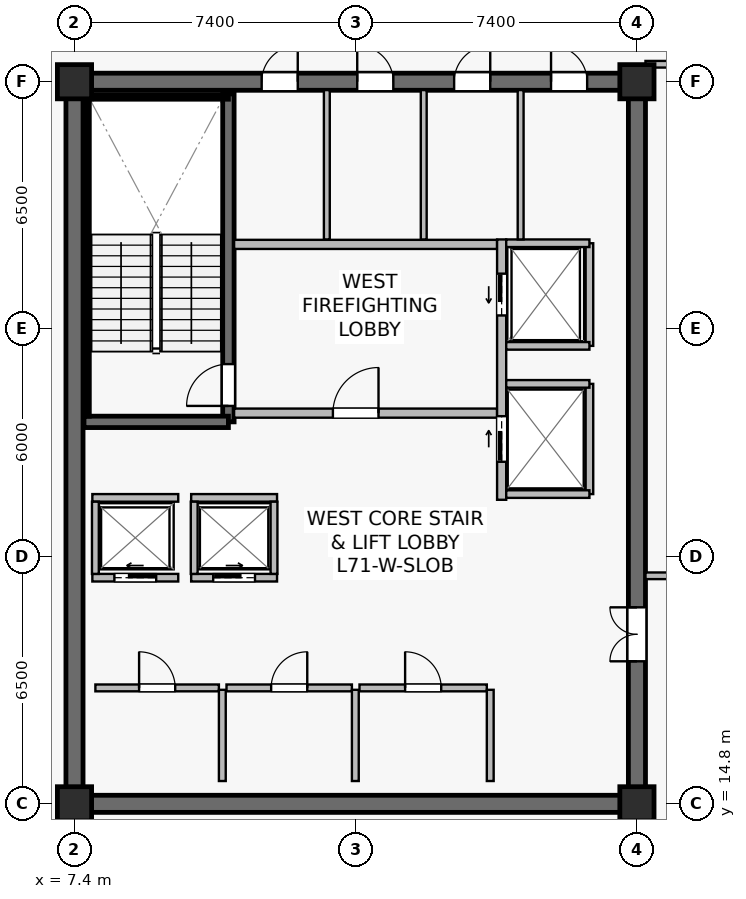
"""IFC4 building model, lengths in metres.
Left out: names, types, materials, properties, quantities, classifications, styles, units other than length and angle.
Written with IfcOpenShell. Run it as: python <this file> out.ifc"""

import sys

from ifc_helpers import new_model, si_unit, direction, frame, frame_2d, origin, origin_2d, place, context, subcontext, project, spatial, rectangle, extrude, source, transform, mapped, element, fill, save


model = new_model("IFC4")
c1 = context("Model", 3, precision=1e-05, world=origin(), true_north=direction((0.0, 1.0)))
c2 = subcontext(c1, "Body", "Model", "MODEL_VIEW")
j1 = project(units=[si_unit("LENGTHUNIT", "METRE"), si_unit("PLANEANGLEUNIT", "RADIAN")], contexts=[c1])
p1 = place(None, origin())
s1 = spatial("IfcSite", under=j1, at=p1, CompositionType="ELEMENT")
p2 = place(p1, origin())
s2 = spatial("IfcBuilding", under=s1, at=p2, CompositionType="ELEMENT")
p3 = place(p2, frame((0.0, 0.0, 297.6)))
s3 = spatial("IfcBuildingStorey", under=s2, at=p3, CompositionType="ELEMENT", Elevation=297.6)
p4 = place(p3, frame((7.175, 14.8, 0.0), z_axis=(0.0, 0.0, 1.0), x_axis=(1.0, 0.0, 0.0)))
e1 = element("IfcWall", 1, at=p4, inside=s3, PredefinedType="SHEAR", context=c2, shape_type="SweptSolid", body=[
    extrude(rectangle(XDim=15.25, YDim=0.45, at=frame_2d((7.625, 0.0))), origin(), (0.0, 0.0, 1.0), 3.9),
])
p5 = place(p3, frame((7.175, 33.8, 0.0), z_axis=(0.0, 0.0, 1.0), x_axis=(1.0, 0.0, 0.0)))
e2 = element("IfcWall", 2, at=p5, inside=s3, PredefinedType="SHEAR", context=c2, shape_type="SweptSolid", body=[
    extrude(rectangle(XDim=15.25, YDim=0.45, at=frame_2d((7.625, 0.0))), origin(), (0.0, 0.0, 1.0), 3.9),
])
p6 = place(p5, frame((5.15, 0.0, 0.0)))
e3 = element("IfcOpeningElement", 3, at=p6, cuts=e2, PredefinedType="OPENING", context=c2, shape_type="SweptSolid", body=[
    extrude(rectangle(XDim=0.95, YDim=2.15, at=frame_2d((0.475, 1.075))), frame((0.0, 0.235, 0.0), z_axis=(0.0, -1.0, 0.0), x_axis=(1.0, 0.0, 0.0)), (0.0, 0.0, 1.0), 0.47),
])
p7 = place(p5, frame((7.665, 0.0, 0.0)))
e4 = element("IfcOpeningElement", 4, at=p7, cuts=e2, PredefinedType="OPENING", context=c2, shape_type="SweptSolid", body=[
    extrude(rectangle(XDim=0.95, YDim=2.15, at=frame_2d((0.475, 1.075))), frame((0.0, 0.235, 0.0), z_axis=(0.0, -1.0, 0.0), x_axis=(1.0, 0.0, 0.0)), (0.0, 0.0, 1.0), 0.47),
])
p8 = place(p5, frame((10.215, 0.0, 0.0)))
e5 = element("IfcOpeningElement", 5, at=p8, cuts=e2, PredefinedType="OPENING", context=c2, shape_type="SweptSolid", body=[
    extrude(rectangle(XDim=0.95, YDim=2.15, at=frame_2d((0.475, 1.075))), frame((0.0, 0.235, 0.0), z_axis=(0.0, -1.0, 0.0), x_axis=(1.0, 0.0, 0.0)), (0.0, 0.0, 1.0), 0.47),
])
p9 = place(p5, frame((12.765, 0.0, 0.0)))
e6 = element("IfcOpeningElement", 6, at=p9, cuts=e2, PredefinedType="OPENING", context=c2, shape_type="SweptSolid", body=[
    extrude(rectangle(XDim=0.95, YDim=2.15, at=frame_2d((0.475, 1.075))), frame((0.0, 0.235, 0.0), z_axis=(0.0, -1.0, 0.0), x_axis=(1.0, 0.0, 0.0)), (0.0, 0.0, 1.0), 0.47),
])
p10 = place(p3, frame((7.4, 15.025, 0.0), z_axis=(0.0, 0.0, 1.0), x_axis=(0.0, 1.0, 0.0)))
e7 = element("IfcWall", 7, at=p10, inside=s3, PredefinedType="SHEAR", context=c2, shape_type="SweptSolid", body=[
    extrude(rectangle(XDim=18.55, YDim=0.45, at=frame_2d((9.275, 0.0))), origin(), (0.0, 0.0, 1.0), 3.9),
])
p11 = place(p3, frame((22.2, 15.025, 0.0), z_axis=(0.0, 0.0, 1.0), x_axis=(0.0, 1.0, 0.0)))
e8 = element("IfcWall", 8, at=p11, inside=s3, PredefinedType="SHEAR", context=c2, shape_type="SweptSolid", body=[
    extrude(rectangle(XDim=18.55, YDim=0.45, at=frame_2d((9.275, 0.0))), origin(), (0.0, 0.0, 1.0), 3.9),
])
p12 = place(p11, frame((3.525, 0.0, 0.0)))
e9 = element("IfcOpeningElement", 9, at=p12, cuts=e8, PredefinedType="OPENING", context=c2, shape_type="SweptSolid", body=[
    extrude(rectangle(XDim=1.42, YDim=2.2, at=frame_2d((0.71, 1.1))), frame((0.0, 0.235, 0.0), z_axis=(0.0, -1.0, 0.0), x_axis=(1.0, 0.0, 0.0)), (0.0, 0.0, 1.0), 0.47),
])
p13 = place(p3, frame((11.45, 24.85, 0.0), z_axis=(0.0, 0.0, 1.0), x_axis=(0.0, 1.0, 0.0)))
e10 = element("IfcWall", 10, at=p13, inside=s3, PredefinedType="SHEAR", context=c2, shape_type="SweptSolid", body=[
    extrude(rectangle(XDim=8.63, YDim=0.3, at=frame_2d((4.315, 0.0))), origin(), (0.0, 0.0, 1.0), 3.9),
])
p14 = place(p13, frame((0.42, 0.0, 0.0)))
e11 = element("IfcOpeningElement", 11, at=p14, cuts=e10, PredefinedType="OPENING", context=c2, shape_type="SweptSolid", body=[
    extrude(rectangle(XDim=1.1, YDim=2.15, at=frame_2d((0.55, 1.075))), frame((0.0, 0.16, 0.0), z_axis=(0.0, -1.0, 0.0), x_axis=(1.0, 0.0, 0.0)), (0.0, 0.0, 1.0), 0.32),
])
p15 = place(p3, frame((7.65, 24.85, 0.0), z_axis=(0.0, 0.0, 1.0), x_axis=(1.0, 0.0, 0.0)))
e12 = element("IfcWall", 12, at=p15, inside=s3, PredefinedType="SHEAR", context=c2, shape_type="SweptSolid", body=[
    extrude(rectangle(XDim=3.8, YDim=0.3, at=frame_2d((1.9, 0.0))), origin(), (0.0, 0.0, 1.0), 3.9),
])
p16 = place(p3, frame((7.73, 33.4, 0.0), z_axis=(0.0, 0.0, 1.0), x_axis=(1.0, 0.0, 0.0)))
e13 = element("IfcWall", 13, at=p16, inside=s3, PredefinedType="SOLIDWALL", context=c2, shape_type="SweptSolid", body=[
    extrude(rectangle(XDim=3.72, YDim=0.12, at=frame_2d((1.86, 0.0))), origin(), (0.0, 0.0, 1.0), 3.9),
])
p17 = place(p3, frame((7.73, 25.0, 0.0), z_axis=(0.0, 0.0, 1.0), x_axis=(0.0, 1.0, 0.0)))
e14 = element("IfcWall", 14, at=p17, inside=s3, PredefinedType="SOLIDWALL", context=c2, shape_type="SweptSolid", body=[
    extrude(rectangle(XDim=8.32, YDim=0.12, at=frame_2d((4.16, 0.0))), origin(), (0.0, 0.0, 1.0), 3.9),
])
m1 = source(origin(), c2, "Body", "SweptSolid", [
    extrude(rectangle(XDim=0.9, YDim=0.9, at=origin_2d()), origin(), (0.0, 0.0, 1.0), 4.2),
])
for number, where, z_axis, x_axis in (
    (15, (7.4, 14.8, 0.0), (0.0, 0.0, 1.0), (1.0, 0.0, 0.0)),
    (16, (22.2, 14.8, 0.0), (0.0, 0.0, 1.0), (1.0, 0.0, 0.0)),
    (17, (7.4, 33.8, 0.0), (0.0, 0.0, 1.0), (1.0, 0.0, 0.0)),
    (18, (22.2, 33.8, 0.0), (0.0, 0.0, 1.0), (1.0, 0.0, 0.0)),
):
    element("IfcColumn", number, at=place(p3, frame(where, z_axis=z_axis, x_axis=x_axis)), inside=s3, PredefinedType="COLUMN", context=c2, shape_type="MappedRepresentation", body=[
        mapped(m1, transform((0.0, 0.0, 0.0), scale=1.0)),
    ])
p18 = place(p3, frame((11.6, 25.08, 0.0), z_axis=(0.0, 0.0, 1.0), x_axis=(1.0, 0.0, 0.0)))
e19 = element("IfcWall", 19, at=p18, inside=s3, PredefinedType="SOLIDWALL", context=c2, shape_type="SweptSolid", body=[
    extrude(rectangle(XDim=6.92, YDim=0.24, at=frame_2d((3.46, 0.0))), origin(), (0.0, 0.0, 1.0), 3.297),
])
p19 = place(p18, frame((2.6, 0.0, 0.0)))
e20 = element("IfcOpeningElement", 20, at=p19, cuts=e19, PredefinedType="OPENING", context=c2, shape_type="SweptSolid", body=[
    extrude(rectangle(XDim=1.2, YDim=2.16, at=frame_2d((0.6, 1.08))), frame((0.0, 0.13, 0.0), z_axis=(0.0, -1.0, 0.0), x_axis=(1.0, 0.0, 0.0)), (0.0, 0.0, 1.0), 0.26),
])
p20 = place(p3, frame((11.6, 29.52, 0.0), z_axis=(0.0, 0.0, 1.0), x_axis=(1.0, 0.0, 0.0)))
e21 = element("IfcWall", 21, at=p20, inside=s3, PredefinedType="SOLIDWALL", context=c2, shape_type="SweptSolid", body=[
    extrude(rectangle(XDim=6.92, YDim=0.24, at=frame_2d((3.46, 0.0))), origin(), (0.0, 0.0, 1.0), 3.297),
])
p21 = place(p3, frame((18.64, 22.8, 0.0), z_axis=(0.0, 0.0, 1.0), x_axis=(0.0, 1.0, 0.0)))
e22 = element("IfcWall", 22, at=p21, inside=s3, PredefinedType="SOLIDWALL", context=c2, shape_type="SweptSolid", body=[
    extrude(rectangle(XDim=6.85, YDim=0.24, at=frame_2d((3.425, 0.0))), origin(), (0.0, 0.0, 1.0), 3.035),
])
p22 = place(p21, frame((4.85, 0.0, 0.0)))
e23 = element("IfcOpeningElement", 23, at=p22, cuts=e22, PredefinedType="OPENING", context=c2, shape_type="SweptSolid", body=[
    extrude(rectangle(XDim=1.1, YDim=2.22, at=frame_2d((0.55, 1.11))), frame((0.0, 0.13, 0.0), z_axis=(0.0, -1.0, 0.0), x_axis=(1.0, 0.0, 0.0)), (0.0, 0.0, 1.0), 0.26),
])
p23 = place(p21, frame((1.0, 0.0, 0.0)))
e24 = element("IfcOpeningElement", 24, at=p23, cuts=e22, PredefinedType="OPENING", context=c2, shape_type="SweptSolid", body=[
    extrude(rectangle(XDim=1.2, YDim=2.22, at=frame_2d((0.6, 1.11))), frame((0.0, 0.13, 0.0), z_axis=(0.0, -1.0, 0.0), x_axis=(1.0, 0.0, 0.0)), (0.0, 0.0, 1.0), 0.26),
])
p24 = place(p3, frame((7.87, 20.75, 0.0), z_axis=(0.0, 0.0, 1.0), x_axis=(1.0, 0.0, 0.0)))
e25 = element("IfcWall", 25, at=p24, inside=s3, PredefinedType="SOLIDWALL", context=c2, shape_type="SweptSolid", body=[
    extrude(rectangle(XDim=2.26, YDim=0.2, at=frame_2d((1.13, 0.0))), origin(), (0.0, 0.0, 1.0), 3.9),
])
p25 = place(p24, frame((0.58, 0.0, 0.0)))
e26 = element("IfcOpeningElement", 26, at=p25, cuts=e25, PredefinedType="OPENING", context=c2, shape_type="SweptSolid", body=[
    extrude(rectangle(XDim=1.1, YDim=2.22, at=frame_2d((0.55, 1.11))), frame((0.0, 0.11, 0.0), z_axis=(0.0, -1.0, 0.0), x_axis=(1.0, 0.0, 0.0)), (0.0, 0.0, 1.0), 0.22),
])
p26 = place(p3, frame((7.87, 22.85, 0.0), z_axis=(0.0, 0.0, 1.0), x_axis=(1.0, 0.0, 0.0)))
e27 = element("IfcWall", 27, at=p26, inside=s3, PredefinedType="SOLIDWALL", context=c2, shape_type="SweptSolid", body=[
    extrude(rectangle(XDim=2.26, YDim=0.2, at=frame_2d((1.13, 0.0))), origin(), (0.0, 0.0, 1.0), 3.9),
])
p27 = place(p3, frame((7.95, 20.85, 0.0), z_axis=(0.0, 0.0, 1.0), x_axis=(0.0, 1.0, 0.0)))
e28 = element("IfcWall", 28, at=p27, inside=s3, PredefinedType="SOLIDWALL", context=c2, shape_type="SweptSolid", body=[
    extrude(rectangle(XDim=1.9, YDim=0.18, at=frame_2d((0.95, 0.0))), origin(), (0.0, 0.0, 1.0), 3.9),
])
p28 = place(p3, frame((10.47, 20.75, 0.0), z_axis=(0.0, 0.0, 1.0), x_axis=(1.0, 0.0, 0.0)))
e29 = element("IfcWall", 29, at=p28, inside=s3, PredefinedType="SOLIDWALL", context=c2, shape_type="SweptSolid", body=[
    extrude(rectangle(XDim=2.26, YDim=0.2, at=frame_2d((1.13, 0.0))), origin(), (0.0, 0.0, 1.0), 3.9),
])
p29 = place(p28, frame((0.58, 0.0, 0.0)))
e30 = element("IfcOpeningElement", 30, at=p29, cuts=e29, PredefinedType="OPENING", context=c2, shape_type="SweptSolid", body=[
    extrude(rectangle(XDim=1.1, YDim=2.22, at=frame_2d((0.55, 1.11))), frame((0.0, 0.11, 0.0), z_axis=(0.0, -1.0, 0.0), x_axis=(1.0, 0.0, 0.0)), (0.0, 0.0, 1.0), 0.22),
])
p30 = place(p3, frame((10.47, 22.85, 0.0), z_axis=(0.0, 0.0, 1.0), x_axis=(1.0, 0.0, 0.0)))
e31 = element("IfcWall", 31, at=p30, inside=s3, PredefinedType="SOLIDWALL", context=c2, shape_type="SweptSolid", body=[
    extrude(rectangle(XDim=2.26, YDim=0.2, at=frame_2d((1.13, 0.0))), origin(), (0.0, 0.0, 1.0), 3.9),
])
for number, where, z_axis, x_axis in (
    (32, (10.55, 20.85, 0.0), (0.0, 0.0, 1.0), (0.0, 1.0, 0.0)),
    (33, (12.65, 20.85, 0.0), (0.0, 0.0, 1.0), (0.0, 1.0, 0.0)),
):
    element("IfcWall", number, at=place(p3, frame(where, z_axis=z_axis, x_axis=x_axis)), inside=s3, PredefinedType="SOLIDWALL", context=c2, shape_type="SweptSolid", body=[
        extrude(rectangle(XDim=1.9, YDim=0.18, at=frame_2d((0.95, 0.0))), origin(), (0.0, 0.0, 1.0), 3.9),
    ])
p31 = place(p3, frame((20.95, 26.85, 0.0), z_axis=(0.0, 0.0, 1.0), x_axis=(0.0, 1.0, 0.0)))
e34 = element("IfcWall", 34, at=p31, inside=s3, PredefinedType="SOLIDWALL", context=c2, shape_type="SweptSolid", body=[
    extrude(rectangle(XDim=2.7, YDim=0.2, at=frame_2d((1.35, 0.0))), origin(), (0.0, 0.0, 1.0), 3.9),
])
p32 = place(p3, frame((18.76, 29.55, 0.0), z_axis=(0.0, 0.0, 1.0), x_axis=(1.0, 0.0, 0.0)))
e35 = element("IfcWall", 35, at=p32, inside=s3, PredefinedType="SOLIDWALL", context=c2, shape_type="SweptSolid", body=[
    extrude(rectangle(XDim=2.19, YDim=0.2, at=frame_2d((1.095, 0.0))), origin(), (0.0, 0.0, 1.0), 3.9),
])
p33 = place(p3, frame((18.76, 26.85, 0.0), z_axis=(0.0, 0.0, 1.0), x_axis=(1.0, 0.0, 0.0)))
e36 = element("IfcWall", 36, at=p33, inside=s3, PredefinedType="SOLIDWALL", context=c2, shape_type="SweptSolid", body=[
    extrude(rectangle(XDim=2.19, YDim=0.2, at=frame_2d((1.095, 0.0))), origin(), (0.0, 0.0, 1.0), 3.297),
])
p34 = place(p3, frame((20.95, 22.95, 0.0), z_axis=(0.0, 0.0, 1.0), x_axis=(0.0, 1.0, 0.0)))
e37 = element("IfcWall", 37, at=p34, inside=s3, PredefinedType="SOLIDWALL", context=c2, shape_type="SweptSolid", body=[
    extrude(rectangle(XDim=2.9, YDim=0.2, at=frame_2d((1.45, 0.0))), origin(), (0.0, 0.0, 1.0), 3.035),
])
for number, where, z_axis, x_axis in (
    (38, (18.76, 25.85, 0.0), (0.0, 0.0, 1.0), (1.0, 0.0, 0.0)),
    (39, (18.76, 22.95, 0.0), (0.0, 0.0, 1.0), (1.0, 0.0, 0.0)),
):
    element("IfcWall", number, at=place(p3, frame(where, z_axis=z_axis, x_axis=x_axis)), inside=s3, PredefinedType="SOLIDWALL", context=c2, shape_type="SweptSolid", body=[
        extrude(rectangle(XDim=2.19, YDim=0.2, at=frame_2d((1.095, 0.0))), origin(), (0.0, 0.0, 1.0), 3.9),
    ])
p35 = place(p3, frame((7.95, 17.85, 0.0), z_axis=(0.0, 0.0, 1.0), x_axis=(1.0, 0.0, 0.0)))
e40 = element("IfcWall", 40, at=p35, inside=s3, PredefinedType="SOLIDWALL", context=c2, shape_type="SweptSolid", body=[
    extrude(rectangle(XDim=3.25, YDim=0.18, at=frame_2d((1.625, 0.0))), origin(), (0.0, 0.0, 1.0), 3.9),
])
p36 = place(p35, frame((1.15, 0.0, 0.0)))
e41 = element("IfcOpeningElement", 41, at=p36, cuts=e40, PredefinedType="OPENING", context=c2, shape_type="SweptSolid", body=[
    extrude(rectangle(XDim=0.95, YDim=2.15, at=frame_2d((0.475, 1.075))), frame((0.0, 0.1, 0.0), z_axis=(0.0, -1.0, 0.0), x_axis=(1.0, 0.0, 0.0)), (0.0, 0.0, 1.0), 0.2),
])
p37 = place(p3, frame((11.29, 15.4, 0.0), z_axis=(0.0, 0.0, 1.0), x_axis=(0.0, 1.0, 0.0)))
e42 = element("IfcWall", 42, at=p37, inside=s3, PredefinedType="SOLIDWALL", context=c2, shape_type="SweptSolid", body=[
    extrude(rectangle(XDim=2.4, YDim=0.18, at=frame_2d((1.2, 0.0))), origin(), (0.0, 0.0, 1.0), 3.9),
])
p38 = place(p3, frame((11.4, 17.85, 0.0), z_axis=(0.0, 0.0, 1.0), x_axis=(1.0, 0.0, 0.0)))
e43 = element("IfcWall", 43, at=p38, inside=s3, PredefinedType="SOLIDWALL", context=c2, shape_type="SweptSolid", body=[
    extrude(rectangle(XDim=3.3, YDim=0.18, at=frame_2d((1.65, 0.0))), origin(), (0.0, 0.0, 1.0), 3.297),
])
p39 = place(p38, frame((1.175, 0.0, 0.0)))
e44 = element("IfcOpeningElement", 44, at=p39, cuts=e43, PredefinedType="OPENING", context=c2, shape_type="SweptSolid", body=[
    extrude(rectangle(XDim=0.95, YDim=2.15, at=frame_2d((0.475, 1.075))), frame((0.0, 0.1, 0.0), z_axis=(0.0, -1.0, 0.0), x_axis=(1.0, 0.0, 0.0)), (0.0, 0.0, 1.0), 0.2),
])
p40 = place(p3, frame((14.79, 15.4, 0.0), z_axis=(0.0, 0.0, 1.0), x_axis=(0.0, 1.0, 0.0)))
e45 = element("IfcWall", 45, at=p40, inside=s3, PredefinedType="SOLIDWALL", context=c2, shape_type="SweptSolid", body=[
    extrude(rectangle(XDim=2.4, YDim=0.18, at=frame_2d((1.2, 0.0))), origin(), (0.0, 0.0, 1.0), 3.297),
])
p41 = place(p3, frame((14.9, 17.85, 0.0), z_axis=(0.0, 0.0, 1.0), x_axis=(1.0, 0.0, 0.0)))
e46 = element("IfcWall", 46, at=p41, inside=s3, PredefinedType="SOLIDWALL", context=c2, shape_type="SweptSolid", body=[
    extrude(rectangle(XDim=3.35, YDim=0.18, at=frame_2d((1.675, 0.0))), origin(), (0.0, 0.0, 1.0), 3.297),
])
p42 = place(p41, frame((1.2, 0.0, 0.0)))
e47 = element("IfcOpeningElement", 47, at=p42, cuts=e46, PredefinedType="OPENING", context=c2, shape_type="SweptSolid", body=[
    extrude(rectangle(XDim=0.95, YDim=2.15, at=frame_2d((0.475, 1.075))), frame((0.0, 0.1, 0.0), z_axis=(0.0, -1.0, 0.0), x_axis=(1.0, 0.0, 0.0)), (0.0, 0.0, 1.0), 0.2),
])
p43 = place(p3, frame((18.34, 15.4, 0.0), z_axis=(0.0, 0.0, 1.0), x_axis=(0.0, 1.0, 0.0)))
e48 = element("IfcWall", 48, at=p43, inside=s3, PredefinedType="SOLIDWALL", context=c2, shape_type="SweptSolid", body=[
    extrude(rectangle(XDim=2.4, YDim=0.18, at=frame_2d((1.2, 0.0))), origin(), (0.0, 0.0, 1.0), 3.9),
])
for number, where, z_axis, x_axis in (
    (49, (14.04, 29.65, 0.0), (0.0, 0.0, 1.0), (0.0, 1.0, 0.0)),
    (50, (16.59, 29.65, 0.0), (0.0, 0.0, 1.0), (0.0, 1.0, 0.0)),
    (51, (19.14, 29.65, 0.0), (0.0, 0.0, 1.0), (0.0, 1.0, 0.0)),
):
    element("IfcWall", number, at=place(p3, frame(where, z_axis=z_axis, x_axis=x_axis)), inside=s3, PredefinedType="PLUMBINGWALL", context=c2, shape_type="SweptSolid", body=[
        extrude(rectangle(XDim=3.93, YDim=0.155, at=frame_2d((1.965, 0.0))), origin(), (0.0, 0.0, 1.0), 3.9),
    ])
p44 = place(p3, frame((22.425, 34.26, 0.0), z_axis=(0.0, 0.0, 1.0), x_axis=(1.0, 0.0, 0.0)))
e52 = element("IfcWall", 52, at=p44, inside=s3, PredefinedType="PARTITIONING", context=c2, shape_type="SweptSolid", body=[
    extrude(rectangle(XDim=4.075, YDim=0.175, at=frame_2d((2.038, 0.0))), origin(), (0.0, 0.0, 1.0), 3.635),
])
p45 = place(p3, frame((22.425, 20.8, 0.0), z_axis=(0.0, 0.0, 1.0), x_axis=(1.0, 0.0, 0.0)))
e53 = element("IfcWall", 53, at=p45, inside=s3, PredefinedType="PARTITIONING", context=c2, shape_type="SweptSolid", body=[
    extrude(rectangle(XDim=4.075, YDim=0.175, at=frame_2d((2.038, 0.0))), origin(), (0.0, 0.0, 1.0), 3.9),
])
p46 = place(p45, frame((1.35, 0.0, 0.0)))
e54 = element("IfcOpeningElement", 54, at=p46, cuts=e53, PredefinedType="OPENING", context=c2, shape_type="SweptSolid", body=[
    extrude(rectangle(XDim=0.95, YDim=2.15, at=frame_2d((0.475, 1.075))), frame((0.0, 0.098, 0.0), z_axis=(0.0, -1.0, 0.0), x_axis=(1.0, 0.0, 0.0)), (0.0, 0.0, 1.0), 0.195),
])
m2 = source(origin(), c2, "Body", "SweptSolid", [
    extrude(rectangle(XDim=1.1, YDim=2.15, at=frame_2d((0.55, 1.075))), frame((0.0, 0.025, 0.0), z_axis=(0.0, -1.0, 0.0), x_axis=(1.0, 0.0, 0.0)), (0.0, 0.0, 1.0), 0.05),
])
p47 = place(p14, origin())
e55 = element("IfcDoor", 55, at=p47, inside=s3, OperationType="SINGLE_SWING_LEFT", PredefinedType="DOOR", context=c2, shape_type="MappedRepresentation", body=[
    mapped(m2, transform((0.0, 0.0, 0.0), scale=1.0)),
])
fill(e11, e55)
m3 = source(origin(), c2, "Body", "SweptSolid", [
    extrude(rectangle(XDim=1.2, YDim=2.16, at=frame_2d((0.6, 1.08))), frame((0.0, 0.025, 0.0), z_axis=(0.0, -1.0, 0.0), x_axis=(1.0, 0.0, 0.0)), (0.0, 0.0, 1.0), 0.05),
])
p48 = place(p19, origin())
e56 = element("IfcDoor", 56, at=p48, inside=s3, OperationType="SINGLE_SWING_RIGHT", PredefinedType="DOOR", context=c2, shape_type="MappedRepresentation", body=[
    mapped(m3, transform((0.0, 0.0, 0.0), scale=1.0)),
])
fill(e20, e56)
m4 = source(origin(), c2, "Body", "SweptSolid", [
    extrude(rectangle(XDim=1.1, YDim=2.22, at=frame_2d((0.55, 1.11))), frame((0.0, 0.025, 0.0), z_axis=(0.0, -1.0, 0.0), x_axis=(1.0, 0.0, 0.0)), (0.0, 0.0, 1.0), 0.05),
])
p49 = place(p25, origin())
e57 = element("IfcDoor", 57, at=p49, inside=s3, OperationType="SLIDING_TO_LEFT", PredefinedType="USERDEFINED", context=c2, shape_type="MappedRepresentation", body=[
    mapped(m4, transform((0.0, 0.0, 0.0), scale=1.0)),
])
fill(e26, e57)
p50 = place(p29, origin())
e58 = element("IfcDoor", 58, at=p50, inside=s3, OperationType="SLIDING_TO_RIGHT", PredefinedType="USERDEFINED", context=c2, shape_type="MappedRepresentation", body=[
    mapped(m4, transform((0.0, 0.0, 0.0), scale=1.0)),
])
fill(e30, e58)
p51 = place(p22, origin())
e59 = element("IfcDoor", 59, at=p51, inside=s3, OperationType="SLIDING_TO_LEFT", PredefinedType="USERDEFINED", context=c2, shape_type="MappedRepresentation", body=[
    mapped(m4, transform((0.0, 0.0, 0.0), scale=1.0)),
])
fill(e23, e59)
m5 = source(origin(), c2, "Body", "SweptSolid", [
    extrude(rectangle(XDim=1.2, YDim=2.22, at=frame_2d((0.6, 1.11))), frame((0.0, 0.025, 0.0), z_axis=(0.0, -1.0, 0.0), x_axis=(1.0, 0.0, 0.0)), (0.0, 0.0, 1.0), 0.05),
])
p52 = place(p23, origin())
e60 = element("IfcDoor", 60, at=p52, inside=s3, OperationType="SLIDING_TO_RIGHT", PredefinedType="USERDEFINED", context=c2, shape_type="MappedRepresentation", body=[
    mapped(m5, transform((0.0, 0.0, 0.0), scale=1.0)),
])
fill(e24, e60)
m6 = source(origin(), c2, "Body", "SweptSolid", [
    extrude(rectangle(XDim=0.95, YDim=2.15, at=frame_2d((0.475, 1.075))), frame((0.0, 0.025, 0.0), z_axis=(0.0, -1.0, 0.0), x_axis=(1.0, 0.0, 0.0)), (0.0, 0.0, 1.0), 0.05),
])
p53 = place(p36, origin())
e61 = element("IfcDoor", 61, at=p53, inside=s3, OperationType="SINGLE_SWING_LEFT", PredefinedType="DOOR", context=c2, shape_type="MappedRepresentation", body=[
    mapped(m6, transform((0.0, 0.0, 0.0), scale=1.0)),
])
fill(e41, e61)
p54 = place(p39, origin())
e62 = element("IfcDoor", 62, at=p54, inside=s3, OperationType="SINGLE_SWING_RIGHT", PredefinedType="DOOR", context=c2, shape_type="MappedRepresentation", body=[
    mapped(m6, transform((0.0, 0.0, 0.0), scale=1.0)),
])
fill(e44, e62)
p55 = place(p42, origin())
e63 = element("IfcDoor", 63, at=p55, inside=s3, OperationType="SINGLE_SWING_LEFT", PredefinedType="DOOR", context=c2, shape_type="MappedRepresentation", body=[
    mapped(m6, transform((0.0, 0.0, 0.0), scale=1.0)),
])
fill(e47, e63)
m7 = source(origin(), c2, "Body", "SweptSolid", [
    extrude(rectangle(XDim=1.42, YDim=2.2, at=frame_2d((0.71, 1.1))), frame((0.0, 0.025, 0.0), z_axis=(0.0, -1.0, 0.0), x_axis=(1.0, 0.0, 0.0)), (0.0, 0.0, 1.0), 0.05),
])
p56 = place(p12, origin())
e64 = element("IfcDoor", 64, at=p56, inside=s3, OperationType="DOUBLE_DOOR_SINGLE_SWING", PredefinedType="DOOR", context=c2, shape_type="MappedRepresentation", body=[
    mapped(m7, transform((0.0, 0.0, 0.0), scale=1.0)),
])
fill(e9, e64)
p57 = place(p6, origin())
e65 = element("IfcDoor", 65, at=p57, inside=s3, OperationType="SINGLE_SWING_RIGHT", PredefinedType="DOOR", context=c2, shape_type="MappedRepresentation", body=[
    mapped(m6, transform((0.0, 0.0, 0.0), scale=1.0)),
])
fill(e3, e65)
p58 = place(p7, origin())
e66 = element("IfcDoor", 66, at=p58, inside=s3, OperationType="SINGLE_SWING_LEFT", PredefinedType="DOOR", context=c2, shape_type="MappedRepresentation", body=[
    mapped(m6, transform((0.0, 0.0, 0.0), scale=1.0)),
])
fill(e4, e66)
p59 = place(p8, origin())
e67 = element("IfcDoor", 67, at=p59, inside=s3, OperationType="SINGLE_SWING_RIGHT", PredefinedType="DOOR", context=c2, shape_type="MappedRepresentation", body=[
    mapped(m6, transform((0.0, 0.0, 0.0), scale=1.0)),
])
fill(e5, e67)
p60 = place(p9, origin())
e68 = element("IfcDoor", 68, at=p60, inside=s3, OperationType="SINGLE_SWING_LEFT", PredefinedType="DOOR", context=c2, shape_type="MappedRepresentation", body=[
    mapped(m6, transform((0.0, 0.0, 0.0), scale=1.0)),
])
fill(e6, e68)
save(model, sys.argv[1])
